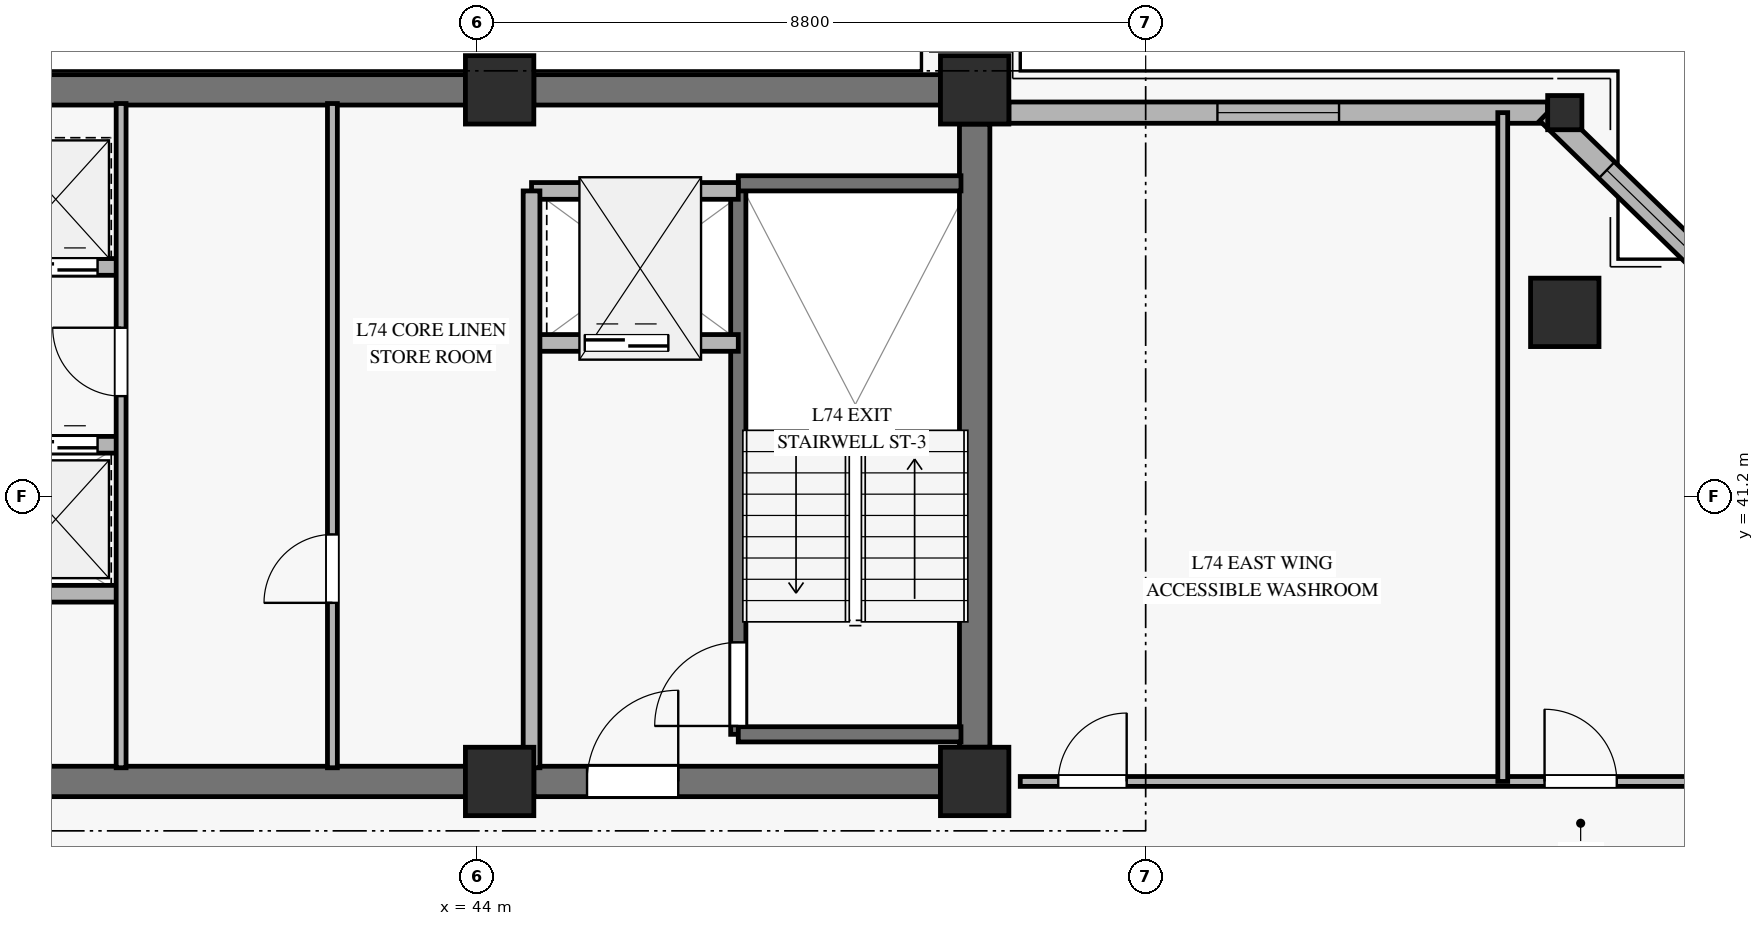
"""IFC4 building model, lengths in metres.
Left out: names, types, materials, properties, quantities, classifications, styles, units other than length and angle.
Written with IfcOpenShell. Run it as: python <this file> out.ifc"""

import sys

from ifc_helpers import new_model, si_unit, direction, frame, frame_2d, origin, origin_2d, place, context, subcontext, project, spatial, rectangle, hollow_rectangle, extrude, source, transform, mapped, element, fill, save


model = new_model("IFC4")
c1 = context("Model", 3, precision=1e-05, world=origin(), true_north=direction((0.0, 1.0)))
c2 = subcontext(c1, "Body", "Model", "MODEL_VIEW")
j1 = project(units=[si_unit("LENGTHUNIT", "METRE"), si_unit("PLANEANGLEUNIT", "RADIAN")], contexts=[c1])
p1 = place(None, origin())
s1 = spatial("IfcSite", under=j1, at=p1, CompositionType="ELEMENT")
p2 = place(p1, origin())
s2 = spatial("IfcBuilding", under=s1, at=p2, CompositionType="ELEMENT")
p3 = place(p2, frame((0.0, 0.0, 290.4)))
s3 = spatial("IfcBuildingStorey", under=s2, at=p3, CompositionType="ELEMENT", Elevation=290.4)
m1 = source(origin(), c2, "Body", "SweptSolid", [
    extrude(rectangle(XDim=0.9, YDim=0.9, at=origin_2d()), origin(), (0.0, 0.0, 1.0), 3.185),
])
for number, where, z_axis, x_axis in (
    (1, (44.3, 37.45, 0.0), (0.0, 0.0, 1.0), (1.0, 0.0, 0.0)),
    (2, (44.3, 46.55, 0.0), (0.0, 0.0, 1.0), (1.0, 0.0, 0.0)),
    (3, (50.55, 37.45, 0.0), (0.0, 0.0, 1.0), (1.0, 0.0, 0.0)),
    (4, (50.55, 46.55, 0.0), (0.0, 0.0, 1.0), (1.0, 0.0, 0.0)),
):
    element("IfcColumn", number, at=place(p3, frame(where, z_axis=z_axis, x_axis=x_axis)), inside=s3, PredefinedType="PILASTER", context=c2, shape_type="MappedRepresentation", body=[
        mapped(m1, transform((0.0, 0.0, 0.0), x_axis=(1.0, 0.0, 0.0), y_axis=(0.0, 1.0, 0.0), z_axis=(0.0, 0.0, 1.0), scale=1.0)),
    ])
p4 = place(p3, frame((36.05, 46.55, 0.0), z_axis=(0.0, 0.0, 1.0), x_axis=(1.0, 0.0, 0.0)))
e5 = element("IfcWall", 5, at=p4, inside=s3, PredefinedType="SHEAR", context=c2, shape_type="SweptSolid", body=[
    extrude(rectangle(XDim=7.8, YDim=0.4, at=frame_2d((3.9, 0.0))), origin(), (0.0, 0.0, 1.0), 3.185),
])
p5 = place(p3, frame((44.75, 46.55, 0.0), z_axis=(0.0, 0.0, 1.0), x_axis=(1.0, 0.0, 0.0)))
e6 = element("IfcWall", 6, at=p5, inside=s3, PredefinedType="SHEAR", context=c2, shape_type="SweptSolid", body=[
    extrude(rectangle(XDim=5.35, YDim=0.4, at=frame_2d((2.675, 0.0))), origin(), (0.0, 0.0, 1.0), 3.185),
])
p6 = place(p3, frame((36.05, 37.45, 0.0), z_axis=(0.0, 0.0, 1.0), x_axis=(1.0, 0.0, 0.0)))
e7 = element("IfcWall", 7, at=p6, inside=s3, PredefinedType="SHEAR", context=c2, shape_type="SweptSolid", body=[
    extrude(rectangle(XDim=7.8, YDim=0.4, at=frame_2d((3.9, 0.0))), origin(), (0.0, 0.0, 1.0), 3.185),
])
p7 = place(p3, frame((44.75, 37.45, 0.0), z_axis=(0.0, 0.0, 1.0), x_axis=(1.0, 0.0, 0.0)))
e8 = element("IfcWall", 8, at=p7, inside=s3, PredefinedType="SHEAR", context=c2, shape_type="SweptSolid", body=[
    extrude(rectangle(XDim=5.35, YDim=0.4, at=frame_2d((2.675, 0.0))), origin(), (0.0, 0.0, 1.0), 3.185),
])
p8 = place(p7, frame((0.7, 0.0, 0.0)))
e9 = element("IfcOpeningElement", 9, at=p8, cuts=e8, PredefinedType="OPENING", context=c2, shape_type="SweptSolid", body=[
    extrude(rectangle(XDim=1.2, YDim=2.15, at=frame_2d((0.6, 1.075))), frame((0.0, 0.21, 0.0), z_axis=(0.0, -1.0, 0.0), x_axis=(1.0, 0.0, 0.0)), (0.0, 0.0, 1.0), 0.42),
])
p9 = place(p3, frame((50.55, 37.9, 0.0), z_axis=(0.0, 0.0, 1.0), x_axis=(0.0, 1.0, 0.0)))
e10 = element("IfcWall", 10, at=p9, inside=s3, PredefinedType="SHEAR", context=c2, shape_type="SweptSolid", body=[
    extrude(rectangle(XDim=8.2, YDim=0.4, at=frame_2d((4.1, 0.0))), origin(), (0.0, 0.0, 1.0), 3.185),
])
m2 = source(origin(), c2, "Body", "SweptSolid", [
    extrude(hollow_rectangle(XDim=0.9, YDim=0.9, WallThickness=0.04, at=origin_2d()), origin(), (0.0, 0.0, 1.0), 3.207),
])
p10 = place(p3, frame((58.314, 43.622, 0.0), z_axis=(-0.115039538248, 0.014617863232, 0.993253352732), x_axis=(-0.12605458305, -0.992023307232, 0.0)))
e11 = element("IfcColumn", 11, at=p10, inside=s3, PredefinedType="COLUMN", context=c2, shape_type="MappedRepresentation", body=[
    mapped(m2, transform((0.0, 0.0, 0.0), x_axis=(1.0, 0.0, 0.0), y_axis=(0.0, 1.0, 0.0), z_axis=(0.0, 0.0, 1.0), scale=1.0)),
])
m3 = source(origin(), c2, "Body", "SweptSolid", [
    extrude(hollow_rectangle(XDim=0.45, YDim=0.45, WallThickness=0.022, at=origin_2d()), origin(), (0.0, 0.0, 1.0), 3.206),
])
p11 = place(p3, frame((58.314, 46.25, 0.0), z_axis=(-0.115051831153, 0.0, 0.993359489887), x_axis=(0.0, -1.0, 0.0)))
e12 = element("IfcColumn", 12, at=p11, inside=s3, PredefinedType="COLUMN", context=c2, shape_type="MappedRepresentation", body=[
    mapped(m3, transform((0.0, 0.0, 0.0), x_axis=(1.0, 0.0, 0.0), y_axis=(0.0, 1.0, 0.0), z_axis=(0.0, 0.0, 1.0), scale=1.0)),
])
p12 = place(p3, frame((51.0, 46.25, 0.0), z_axis=(0.0, 0.0, 1.0), x_axis=(1.0, 0.0, 0.0)))
e13 = element("IfcWall", 13, at=p12, inside=s3, PredefinedType="SOLIDWALL", context=c2, shape_type="SweptSolid", body=[
    extrude(rectangle(XDim=7.089, YDim=0.28, at=frame_2d((3.544, 0.0))), origin(), (0.0, 0.0, 1.0), 2.815),
])
p13 = place(p12, frame((2.744, 0.0, 0.45)))
e14 = element("IfcOpeningElement", 14, at=p13, cuts=e13, PredefinedType="OPENING", context=c2, shape_type="SweptSolid", body=[
    extrude(rectangle(XDim=1.6, YDim=2.0, at=frame_2d((0.8, 1.0))), frame((0.0, 0.15, 0.0), z_axis=(0.0, -1.0, 0.0), x_axis=(1.0, 0.0, 0.0)), (0.0, 0.0, 1.0), 0.3),
])
p14 = place(p3, frame((60.791, 43.622, 0.0), z_axis=(0.0, 0.0, 1.0), x_axis=(-0.716851918275, 0.697225449382, 0.0)))
e15 = element("IfcWall", 15, at=p14, inside=s3, PredefinedType="SOLIDWALL", context=c2, shape_type="SweptSolid", body=[
    extrude(rectangle(XDim=3.769, YDim=0.3, at=frame_2d((1.885, 0.0))), origin(), (0.0, 0.0, 1.0), 2.815),
])
p15 = place(p14, frame((1.085, 0.0, 0.45)))
e16 = element("IfcOpeningElement", 16, at=p15, cuts=e15, PredefinedType="OPENING", context=c2, shape_type="SweptSolid", body=[
    extrude(rectangle(XDim=1.6, YDim=2.0, at=frame_2d((0.8, 1.0))), frame((0.0, 0.16, 0.0), z_axis=(0.0, -1.0, 0.0), x_axis=(1.0, 0.0, 0.0)), (0.0, 0.0, 1.0), 0.32),
])
p16 = place(p3, frame((47.44, 38.07, 0.0), z_axis=(0.0, 0.0, 1.0), x_axis=(0.0, 1.0, 0.0)))
e17 = element("IfcWall", 17, at=p16, inside=s3, PredefinedType="SOLIDWALL", context=c2, shape_type="SweptSolid", body=[
    extrude(rectangle(XDim=7.25, YDim=0.2, at=frame_2d((3.625, 0.0))), origin(), (0.0, 0.0, 1.0), 3.4),
])
p17 = place(p16, frame((0.11, 0.0, 0.0)))
e18 = element("IfcOpeningElement", 18, at=p17, cuts=e17, PredefinedType="OPENING", context=c2, shape_type="SweptSolid", body=[
    extrude(rectangle(XDim=1.1, YDim=2.15, at=frame_2d((0.55, 1.075))), frame((0.0, 0.11, 0.0), z_axis=(0.0, -1.0, 0.0), x_axis=(1.0, 0.0, 0.0)), (0.0, 0.0, 1.0), 0.22),
])
for number, where, z_axis, x_axis in (
    (19, (47.44, 45.32, 0.0), (0.0, 0.0, 1.0), (1.0, 0.0, 0.0)),
    (20, (47.44, 38.07, 0.0), (0.0, 0.0, 1.0), (1.0, 0.0, 0.0)),
):
    element("IfcWall", number, at=place(p3, frame(where, z_axis=z_axis, x_axis=x_axis)), inside=s3, PredefinedType="SOLIDWALL", context=c2, shape_type="SweptSolid", body=[
        extrude(rectangle(XDim=2.93, YDim=0.2, at=frame_2d((1.465, 0.0))), origin(), (0.0, 0.0, 1.0), 3.4),
    ])
p18 = place(p3, frame((44.72, 43.22, 0.0), z_axis=(0.0, 0.0, 1.0), x_axis=(1.0, 0.0, 0.0)))
e21 = element("IfcWall", 21, at=p18, inside=s3, PredefinedType="SOLIDWALL", context=c2, shape_type="SweptSolid", body=[
    extrude(rectangle(XDim=2.72, YDim=0.22, at=frame_2d((1.36, 0.0))), origin(), (0.0, 0.0, 1.0), 3.185),
])
p19 = place(p18, frame((0.7, 0.0, 0.0)))
e22 = element("IfcOpeningElement", 22, at=p19, cuts=e21, PredefinedType="OPENING", context=c2, shape_type="SweptSolid", body=[
    extrude(rectangle(XDim=1.1, YDim=2.2, at=frame_2d((0.55, 1.1))), frame((0.0, 0.12, 0.0), z_axis=(0.0, -1.0, 0.0), x_axis=(1.0, 0.0, 0.0)), (0.0, 0.0, 1.0), 0.24),
])
p20 = place(p3, frame((44.72, 45.22, 0.0), z_axis=(0.0, 0.0, 1.0), x_axis=(1.0, 0.0, 0.0)))
e23 = element("IfcWall", 23, at=p20, inside=s3, PredefinedType="SOLIDWALL", context=c2, shape_type="SweptSolid", body=[
    extrude(rectangle(XDim=2.72, YDim=0.22, at=frame_2d((1.36, 0.0))), origin(), (0.0, 0.0, 1.0), 3.185),
])
p21 = place(p3, frame((44.72, 37.63, 0.0), z_axis=(0.0, 0.0, 1.0), x_axis=(0.0, 1.0, 0.0)))
e24 = element("IfcWall", 24, at=p21, inside=s3, PredefinedType="SOLIDWALL", context=c2, shape_type="SweptSolid", body=[
    extrude(rectangle(XDim=7.59, YDim=0.22, at=frame_2d((3.795, 0.0))), origin(), (0.0, 0.0, 1.0), 3.185),
])
p22 = place(p3, frame((36.12, 44.22, 0.0), z_axis=(0.0, 0.0, 1.0), x_axis=(1.0, 0.0, 0.0)))
e25 = element("IfcWall", 25, at=p22, inside=s3, PredefinedType="SOLIDWALL", context=c2, shape_type="SweptSolid", body=[
    extrude(rectangle(XDim=3.2, YDim=0.22, at=frame_2d((1.6, 0.0))), origin(), (0.0, 0.0, 1.0), 3.185),
])
p23 = place(p22, frame((0.3, 0.0, 0.0)))
e26 = element("IfcOpeningElement", 26, at=p23, cuts=e25, PredefinedType="OPENING", context=c2, shape_type="SweptSolid", body=[
    extrude(rectangle(XDim=1.1, YDim=2.2, at=frame_2d((0.55, 1.1))), frame((0.0, 0.12, 0.0), z_axis=(0.0, -1.0, 0.0), x_axis=(1.0, 0.0, 0.0)), (0.0, 0.0, 1.0), 0.24),
])
p24 = place(p22, frame((1.79, 0.0, 0.0)))
e27 = element("IfcOpeningElement", 27, at=p24, cuts=e25, PredefinedType="OPENING", context=c2, shape_type="SweptSolid", body=[
    extrude(rectangle(XDim=1.1, YDim=2.2, at=frame_2d((0.55, 1.1))), frame((0.0, 0.12, 0.0), z_axis=(0.0, -1.0, 0.0), x_axis=(1.0, 0.0, 0.0)), (0.0, 0.0, 1.0), 0.24),
])
p25 = place(p3, frame((36.12, 41.88, 0.0), z_axis=(0.0, 0.0, 1.0), x_axis=(1.0, 0.0, 0.0)))
e28 = element("IfcWall", 28, at=p25, inside=s3, PredefinedType="SOLIDWALL", context=c2, shape_type="SweptSolid", body=[
    extrude(rectangle(XDim=3.2, YDim=0.22, at=frame_2d((1.6, 0.0))), origin(), (0.0, 0.0, 1.0), 3.185),
])
p26 = place(p25, frame((0.3, 0.0, 0.0)))
e29 = element("IfcOpeningElement", 29, at=p26, cuts=e28, PredefinedType="OPENING", context=c2, shape_type="SweptSolid", body=[
    extrude(rectangle(XDim=1.1, YDim=2.2, at=frame_2d((0.55, 1.1))), frame((0.0, 0.12, 0.0), z_axis=(0.0, -1.0, 0.0), x_axis=(1.0, 0.0, 0.0)), (0.0, 0.0, 1.0), 0.24),
])
p27 = place(p25, frame((1.79, 0.0, 0.0)))
e30 = element("IfcOpeningElement", 30, at=p27, cuts=e28, PredefinedType="OPENING", context=c2, shape_type="SweptSolid", body=[
    extrude(rectangle(XDim=1.1, YDim=2.2, at=frame_2d((0.55, 1.1))), frame((0.0, 0.12, 0.0), z_axis=(0.0, -1.0, 0.0), x_axis=(1.0, 0.0, 0.0)), (0.0, 0.0, 1.0), 0.24),
])
p28 = place(p3, frame((36.12, 39.92, 0.0), z_axis=(0.0, 0.0, 1.0), x_axis=(1.0, 0.0, 0.0)))
e31 = element("IfcWall", 31, at=p28, inside=s3, PredefinedType="SOLIDWALL", context=c2, shape_type="SweptSolid", body=[
    extrude(rectangle(XDim=3.2, YDim=0.22, at=frame_2d((1.6, 0.0))), origin(), (0.0, 0.0, 1.0), 3.185),
])
p29 = place(p3, frame((39.32, 37.63, 0.0), z_axis=(0.0, 0.0, 1.0), x_axis=(0.0, 1.0, 0.0)))
e32 = element("IfcWall", 32, at=p29, inside=s3, PredefinedType="PARTITIONING", context=c2, shape_type="SweptSolid", body=[
    extrude(rectangle(XDim=8.74, YDim=0.13, at=frame_2d((4.37, 0.0))), origin(), (0.0, 0.0, 1.0), 3.185),
])
p30 = place(p29, frame((4.89, 0.0, 0.0)))
e33 = element("IfcOpeningElement", 33, at=p30, cuts=e32, PredefinedType="OPENING", context=c2, shape_type="SweptSolid", body=[
    extrude(rectangle(XDim=0.9, YDim=2.1, at=frame_2d((0.45, 1.05))), frame((0.0, 0.075, 0.0), z_axis=(0.0, -1.0, 0.0), x_axis=(1.0, 0.0, 0.0)), (0.0, 0.0, 1.0), 0.15),
])
p31 = place(p3, frame((42.1, 37.63, 0.0), z_axis=(0.0, 0.0, 1.0), x_axis=(0.0, 1.0, 0.0)))
e34 = element("IfcWall", 34, at=p31, inside=s3, PredefinedType="PARTITIONING", context=c2, shape_type="SweptSolid", body=[
    extrude(rectangle(XDim=8.74, YDim=0.13, at=frame_2d((4.37, 0.0))), origin(), (0.0, 0.0, 1.0), 3.185),
])
p32 = place(p31, frame((2.17, 0.0, 0.0)))
e35 = element("IfcOpeningElement", 35, at=p32, cuts=e34, PredefinedType="OPENING", context=c2, shape_type="SweptSolid", body=[
    extrude(rectangle(XDim=0.9, YDim=2.1, at=frame_2d((0.45, 1.05))), frame((0.0, 0.075, 0.0), z_axis=(0.0, -1.0, 0.0), x_axis=(1.0, 0.0, 0.0)), (0.0, 0.0, 1.0), 0.15),
])
p33 = place(p3, frame((51.15, 37.45, 0.0), z_axis=(0.0, 0.0, 1.0), x_axis=(1.0, 0.0, 0.0)))
e36 = element("IfcWall", 36, at=p33, inside=s3, PredefinedType="PARTITIONING", context=c2, shape_type="SweptSolid", body=[
    extrude(rectangle(XDim=9.641, YDim=0.13, at=frame_2d((4.821, 0.0))), origin(), (0.0, 0.0, 1.0), 2.82),
])
p34 = place(p33, frame((0.5, 0.0, 0.0)))
e37 = element("IfcOpeningElement", 37, at=p34, cuts=e36, PredefinedType="OPENING", context=c2, shape_type="SweptSolid", body=[
    extrude(rectangle(XDim=0.9, YDim=2.1, at=frame_2d((0.45, 1.05))), frame((0.0, 0.075, 0.0), z_axis=(0.0, -1.0, 0.0), x_axis=(1.0, 0.0, 0.0)), (0.0, 0.0, 1.0), 0.15),
])
p35 = place(p33, frame((6.898, 0.0, 0.0)))
e38 = element("IfcOpeningElement", 38, at=p35, cuts=e36, PredefinedType="OPENING", context=c2, shape_type="SweptSolid", body=[
    extrude(rectangle(XDim=0.95, YDim=2.1, at=frame_2d((0.475, 1.05))), frame((0.0, 0.075, 0.0), z_axis=(0.0, -1.0, 0.0), x_axis=(1.0, 0.0, 0.0)), (0.0, 0.0, 1.0), 0.15),
])
p36 = place(p3, frame((57.498, 37.45, 0.0), z_axis=(0.0, 0.0, 1.0), x_axis=(0.0, 1.0, 0.0)))
e39 = element("IfcWall", 39, at=p36, inside=s3, PredefinedType="PARTITIONING", context=c2, shape_type="SweptSolid", body=[
    extrude(rectangle(XDim=8.8, YDim=0.13, at=frame_2d((4.4, 0.0))), origin(), (0.0, 0.0, 1.0), 2.82),
])
m4 = source(origin(), c2, "Body", "SweptSolid", [
    extrude(rectangle(XDim=1.6, YDim=2.0, at=frame_2d((0.8, 1.0))), frame((0.0, 0.03, 0.0), z_axis=(0.0, -1.0, 0.0), x_axis=(1.0, 0.0, 0.0)), (0.0, 0.0, 1.0), 0.06),
])
p37 = place(p13, origin())
e40 = element("IfcWindow", 40, at=p37, inside=s3, PartitioningType="SINGLE_PANEL", PredefinedType="WINDOW", context=c2, shape_type="MappedRepresentation", body=[
    mapped(m4, transform((0.0, 0.0, 0.0), x_axis=(1.0, 0.0, 0.0), y_axis=(0.0, 1.0, 0.0), z_axis=(0.0, 0.0, 1.0), scale=1.0)),
])
fill(e14, e40)
p38 = place(p15, origin())
e41 = element("IfcWindow", 41, at=p38, inside=s3, PartitioningType="SINGLE_PANEL", PredefinedType="WINDOW", context=c2, shape_type="MappedRepresentation", body=[
    mapped(m4, transform((0.0, 0.0, 0.0), x_axis=(1.0, 0.0, 0.0), y_axis=(0.0, 1.0, 0.0), z_axis=(0.0, 0.0, 1.0), scale=1.0)),
])
fill(e16, e41)
m5 = source(origin(), c2, "Body", "SweptSolid", [
    extrude(rectangle(XDim=1.1, YDim=2.15, at=frame_2d((0.55, 1.075))), frame((0.0, 0.025, 0.0), z_axis=(0.0, -1.0, 0.0), x_axis=(1.0, 0.0, 0.0)), (0.0, 0.0, 1.0), 0.05),
])
p39 = place(p17, origin())
e42 = element("IfcDoor", 42, at=p39, inside=s3, OperationType="SINGLE_SWING_LEFT", PredefinedType="DOOR", context=c2, shape_type="MappedRepresentation", body=[
    mapped(m5, transform((0.0, 0.0, 0.0), x_axis=(1.0, 0.0, 0.0), y_axis=(0.0, 1.0, 0.0), z_axis=(0.0, 0.0, 1.0), scale=1.0)),
])
fill(e18, e42)
m6 = source(origin(), c2, "Body", "SweptSolid", [
    extrude(rectangle(XDim=1.1, YDim=2.2, at=frame_2d((0.55, 1.1))), frame((0.0, 0.025, 0.0), z_axis=(0.0, -1.0, 0.0), x_axis=(1.0, 0.0, 0.0)), (0.0, 0.0, 1.0), 0.05),
])
p40 = place(p19, origin())
e43 = element("IfcDoor", 43, at=p40, inside=s3, OperationType="SLIDING_TO_LEFT", PredefinedType="DOOR", context=c2, shape_type="MappedRepresentation", body=[
    mapped(m6, transform((0.0, 0.0, 0.0), x_axis=(1.0, 0.0, 0.0), y_axis=(0.0, 1.0, 0.0), z_axis=(0.0, 0.0, 1.0), scale=1.0)),
])
fill(e22, e43)
m7 = source(origin(), c2, "Body", "SweptSolid", [
    extrude(rectangle(XDim=1.2, YDim=2.15, at=frame_2d((0.6, 1.075))), frame((0.0, 0.025, 0.0), z_axis=(0.0, -1.0, 0.0), x_axis=(1.0, 0.0, 0.0)), (0.0, 0.0, 1.0), 0.05),
])
p41 = place(p8, origin())
e44 = element("IfcDoor", 44, at=p41, inside=s3, OperationType="SINGLE_SWING_RIGHT", PredefinedType="DOOR", context=c2, shape_type="MappedRepresentation", body=[
    mapped(m7, transform((0.0, 0.0, 0.0), x_axis=(1.0, 0.0, 0.0), y_axis=(0.0, 1.0, 0.0), z_axis=(0.0, 0.0, 1.0), scale=1.0)),
])
fill(e9, e44)
p42 = place(p24, origin())
e45 = element("IfcDoor", 45, at=p42, inside=s3, OperationType="SLIDING_TO_LEFT", PredefinedType="DOOR", context=c2, shape_type="MappedRepresentation", body=[
    mapped(m6, transform((0.0, 0.0, 0.0), x_axis=(1.0, 0.0, 0.0), y_axis=(0.0, 1.0, 0.0), z_axis=(0.0, 0.0, 1.0), scale=1.0)),
])
fill(e27, e45)
p43 = place(p27, origin())
e46 = element("IfcDoor", 46, at=p43, inside=s3, OperationType="SLIDING_TO_LEFT", PredefinedType="DOOR", context=c2, shape_type="MappedRepresentation", body=[
    mapped(m6, transform((0.0, 0.0, 0.0), x_axis=(1.0, 0.0, 0.0), y_axis=(0.0, 1.0, 0.0), z_axis=(0.0, 0.0, 1.0), scale=1.0)),
])
fill(e30, e46)
m8 = source(origin(), c2, "Body", "SweptSolid", [
    extrude(rectangle(XDim=0.9, YDim=2.1, at=frame_2d((0.45, 1.05))), frame((0.0, 0.025, 0.0), z_axis=(0.0, -1.0, 0.0), x_axis=(1.0, 0.0, 0.0)), (0.0, 0.0, 1.0), 0.05),
])
p44 = place(p30, origin())
e47 = element("IfcDoor", 47, at=p44, inside=s3, OperationType="SINGLE_SWING_RIGHT", PredefinedType="DOOR", context=c2, shape_type="MappedRepresentation", body=[
    mapped(m8, transform((0.0, 0.0, 0.0), x_axis=(1.0, 0.0, 0.0), y_axis=(0.0, 1.0, 0.0), z_axis=(0.0, 0.0, 1.0), scale=1.0)),
])
fill(e33, e47)
p45 = place(p32, origin())
e48 = element("IfcDoor", 48, at=p45, inside=s3, OperationType="SINGLE_SWING_LEFT", PredefinedType="DOOR", context=c2, shape_type="MappedRepresentation", body=[
    mapped(m8, transform((0.0, 0.0, 0.0), x_axis=(1.0, 0.0, 0.0), y_axis=(0.0, 1.0, 0.0), z_axis=(0.0, 0.0, 1.0), scale=1.0)),
])
fill(e35, e48)
p46 = place(p34, origin())
e49 = element("IfcDoor", 49, at=p46, inside=s3, OperationType="SINGLE_SWING_RIGHT", PredefinedType="DOOR", context=c2, shape_type="MappedRepresentation", body=[
    mapped(m8, transform((0.0, 0.0, 0.0), x_axis=(1.0, 0.0, 0.0), y_axis=(0.0, 1.0, 0.0), z_axis=(0.0, 0.0, 1.0), scale=1.0)),
])
fill(e37, e49)
m9 = source(origin(), c2, "Body", "SweptSolid", [
    extrude(rectangle(XDim=0.95, YDim=2.1, at=frame_2d((0.475, 1.05))), frame((0.0, 0.025, 0.0), z_axis=(0.0, -1.0, 0.0), x_axis=(1.0, 0.0, 0.0)), (0.0, 0.0, 1.0), 0.05),
])
p47 = place(p35, origin())
e50 = element("IfcDoor", 50, at=p47, inside=s3, OperationType="SINGLE_SWING_LEFT", PredefinedType="DOOR", context=c2, shape_type="MappedRepresentation", body=[
    mapped(m9, transform((0.0, 0.0, 0.0), x_axis=(1.0, 0.0, 0.0), y_axis=(0.0, 1.0, 0.0), z_axis=(0.0, 0.0, 1.0), scale=1.0)),
])
fill(e38, e50)
save(model, sys.argv[1])
